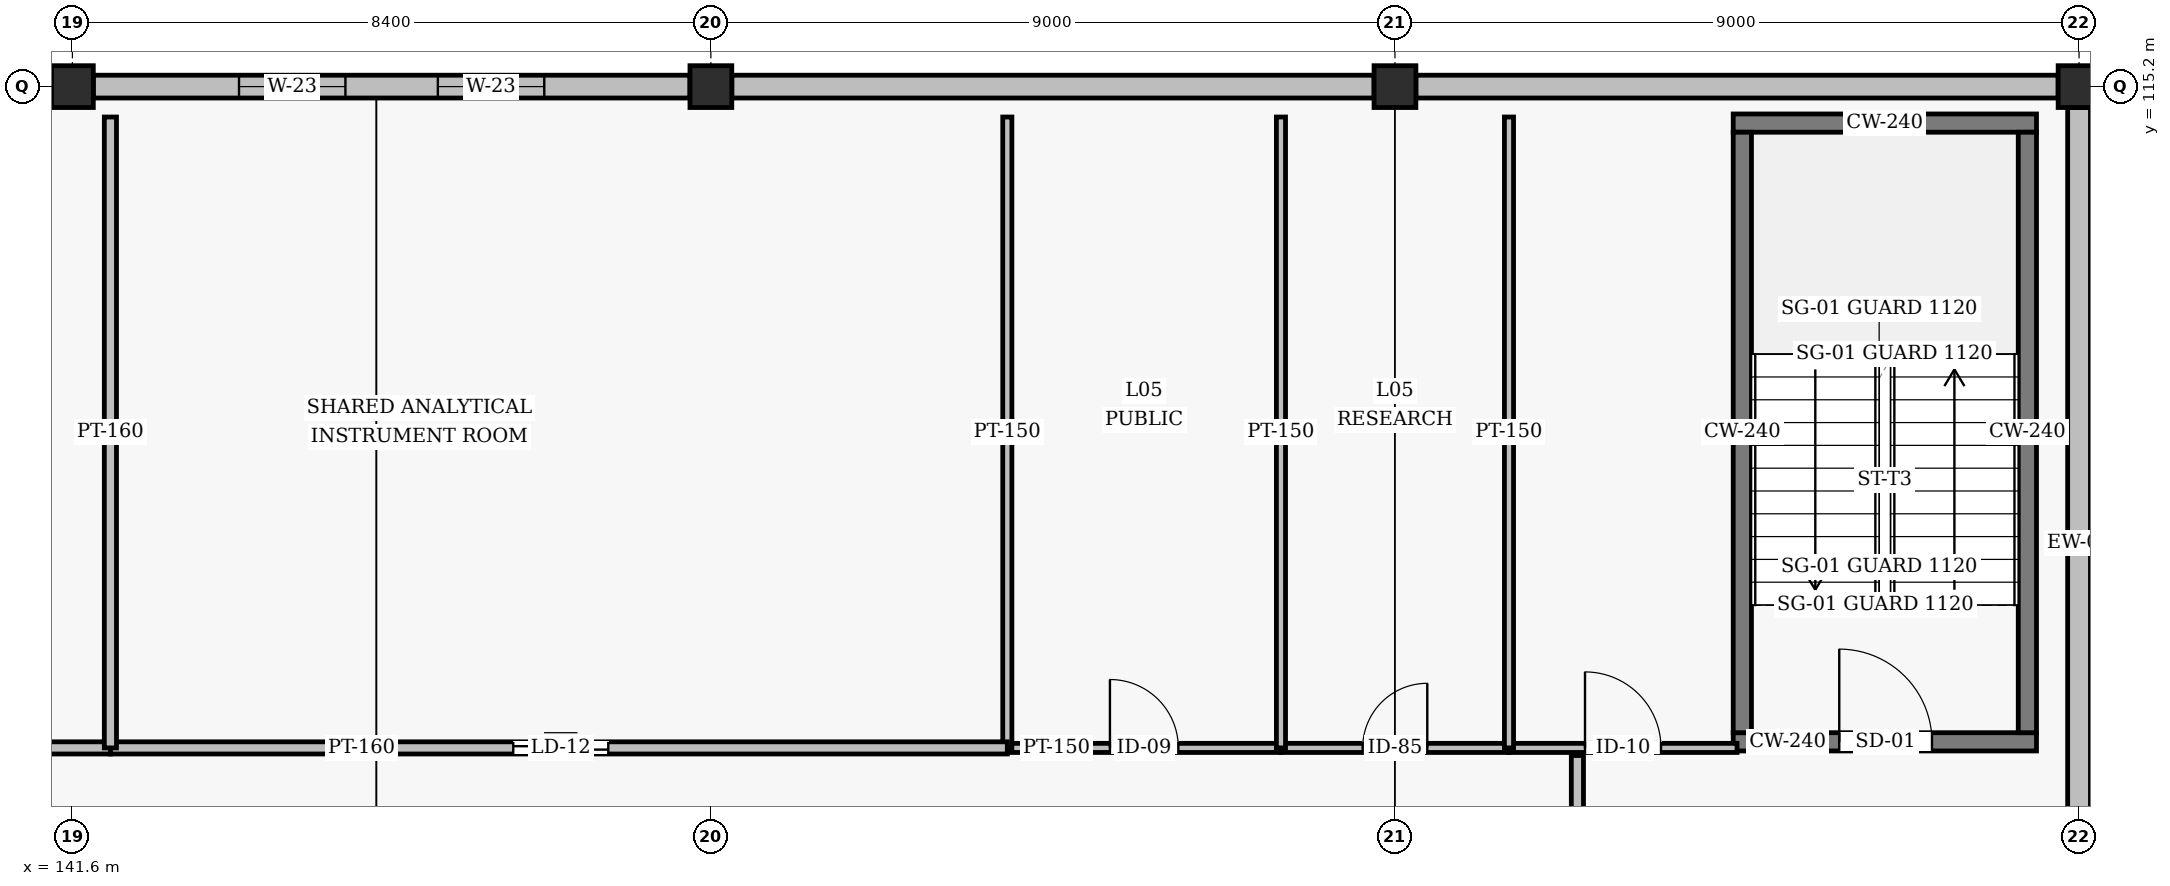
"""IFC4 building model, lengths in metres.
Left out: names, types, materials, properties, quantities, classifications, styles, units other than length and angle.
Written with IfcOpenShell. Run it as: python <this file> out.ifc"""

import sys

from ifc_helpers import new_model, si_unit, direction, frame, frame_2d, origin, origin_2d, place, context, subcontext, project, spatial, rectangle, hollow_rectangle, extrude, element, fill, save


model = new_model("IFC4")
c1 = context("Model", 3, precision=1e-05, world=origin(), true_north=direction((0.0, 1.0)))
c2 = subcontext(c1, "Body", "Model", "MODEL_VIEW")
j1 = project(units=[si_unit("LENGTHUNIT", "METRE"), si_unit("PLANEANGLEUNIT", "RADIAN")], contexts=[c1])
p1 = place(None, origin())
s1 = spatial("IfcSite", under=j1, at=p1, CompositionType="ELEMENT")
p2 = place(p1, origin())
s2 = spatial("IfcBuilding", under=s1, at=p2, CompositionType="ELEMENT")
p3 = place(p2, frame((0.0, 0.0, 21.0)))
s3 = spatial("IfcBuildingStorey", under=s2, at=p3, CompositionType="ELEMENT", Elevation=21.0)
for number, where, z_axis, x_axis in (
    (1, (141.6, 115.2, 0.0), (0.0, 0.0, 1.0), (1.0, 0.0, 0.0)),
    (2, (150.0, 115.2, 0.0), (0.0, 0.0, 1.0), (1.0, 0.0, 0.0)),
    (3, (159.0, 115.2, 0.0), (0.0, 0.0, 1.0), (1.0, 0.0, 0.0)),
    (4, (168.0, 115.2, 0.0), (0.0, 0.0, 1.0), (1.0, 0.0, 0.0)),
):
    element("IfcColumn", number, at=place(p3, frame(where, z_axis=z_axis, x_axis=x_axis)), inside=s3, PredefinedType="COLUMN", context=c2, shape_type="SweptSolid", body=[
        extrude(hollow_rectangle(XDim=0.55, YDim=0.55, WallThickness=0.022, InnerFilletRadius=0.022, OuterFilletRadius=0.044, at=origin_2d()), origin(), (0.0, 0.0, 1.0), 3.6),
    ])
p4 = place(p3, frame((168.0, 103.475, 0.0), z_axis=(0.0, 0.0, 1.0), x_axis=(0.0, 1.0, 0.0)))
e5 = element("IfcWall", 5, at=p4, inside=s3, PredefinedType="SOLIDWALL", context=c2, shape_type="SweptSolid", body=[
    extrude(rectangle(XDim=11.45, YDim=0.3, at=frame_2d((5.725, 0.0))), origin(), (0.0, 0.0, 1.0), 2.558),
])
for number, where, z_axis, x_axis in (
    (6, (167.725, 115.2, 0.0), (0.0, 0.0, 1.0), (-1.0, 0.0, 0.0)),
    (7, (158.725, 115.2, 0.0), (0.0, 0.0, 1.0), (-1.0, 0.0, 0.0)),
):
    element("IfcWall", number, at=place(p3, frame(where, z_axis=z_axis, x_axis=x_axis)), inside=s3, PredefinedType="SOLIDWALL", context=c2, shape_type="SweptSolid", body=[
        extrude(rectangle(XDim=8.45, YDim=0.3, at=frame_2d((4.225, 0.0))), origin(), (0.0, 0.0, 1.0), 2.558),
    ])
p5 = place(p3, frame((149.725, 115.2, 0.0), z_axis=(0.0, 0.0, 1.0), x_axis=(-1.0, 0.0, 0.0)))
e8 = element("IfcWall", 8, at=p5, inside=s3, PredefinedType="SOLIDWALL", context=c2, shape_type="SweptSolid", body=[
    extrude(rectangle(XDim=7.85, YDim=0.3, at=frame_2d((3.925, 0.0))), origin(), (0.0, 0.0, 1.0), 2.85),
])
p6 = place(p5, frame((1.917, 0.0, 0.85)))
e9 = element("IfcOpeningElement", 9, at=p6, cuts=e8, PredefinedType="OPENING", context=c2, shape_type="SweptSolid", body=[
    extrude(rectangle(XDim=1.4, YDim=1.7, at=frame_2d((0.7, 0.85))), frame((0.0, 0.16, 0.0), z_axis=(0.0, -1.0, 0.0), x_axis=(1.0, 0.0, 0.0)), (0.0, 0.0, 1.0), 0.32),
])
p7 = place(p5, frame((4.533, 0.0, 0.85)))
e10 = element("IfcOpeningElement", 10, at=p7, cuts=e8, PredefinedType="OPENING", context=c2, shape_type="SweptSolid", body=[
    extrude(rectangle(XDim=1.4, YDim=1.7, at=frame_2d((0.7, 0.85))), frame((0.0, 0.16, 0.0), z_axis=(0.0, -1.0, 0.0), x_axis=(1.0, 0.0, 0.0)), (0.0, 0.0, 1.0), 0.32),
])
p8 = place(p3, frame((163.45, 106.58, 0.0), z_axis=(0.0, 0.0, 1.0), x_axis=(1.0, 0.0, 0.0)))
e11 = element("IfcWall", 11, at=p8, inside=s3, PredefinedType="SHEAR", context=c2, shape_type="SweptSolid", body=[
    extrude(rectangle(XDim=3.99, YDim=0.24, at=frame_2d((1.995, 0.0))), origin(), (0.0, 0.0, 1.0), 3.35),
])
p9 = place(p8, frame((1.395, 0.0, 0.0)))
e12 = element("IfcOpeningElement", 12, at=p9, cuts=e11, PredefinedType="OPENING", context=c2, shape_type="SweptSolid", body=[
    extrude(rectangle(XDim=1.22, YDim=2.18, at=frame_2d((0.61, 1.09))), frame((0.0, 0.13, 0.0), z_axis=(0.0, -1.0, 0.0), x_axis=(1.0, 0.0, 0.0)), (0.0, 0.0, 1.0), 0.26),
])
p10 = place(p3, frame((163.45, 114.72, 0.0), z_axis=(0.0, 0.0, 1.0), x_axis=(1.0, 0.0, 0.0)))
e13 = element("IfcWall", 13, at=p10, inside=s3, PredefinedType="SHEAR", context=c2, shape_type="SweptSolid", body=[
    extrude(rectangle(XDim=3.99, YDim=0.24, at=frame_2d((1.995, 0.0))), origin(), (0.0, 0.0, 1.0), 3.35),
])
for number, where, z_axis, x_axis in (
    (14, (163.57, 106.7, 0.0), (0.0, 0.0, 1.0), (0.0, 1.0, 0.0)),
    (15, (167.32, 106.7, 0.0), (0.0, 0.0, 1.0), (0.0, 1.0, 0.0)),
):
    element("IfcWall", number, at=place(p3, frame(where, z_axis=z_axis, x_axis=x_axis)), inside=s3, PredefinedType="SHEAR", context=c2, shape_type="SweptSolid", body=[
        extrude(rectangle(XDim=7.9, YDim=0.24, at=frame_2d((3.95, 0.0))), origin(), (0.0, 0.0, 1.0), 3.35),
    ])
p11 = place(p3, frame((153.9, 106.5, 0.0), z_axis=(0.0, 0.0, 1.0), x_axis=(1.0, 0.0, 0.0)))
e16 = element("IfcWall", 16, at=p11, inside=s3, PredefinedType="PARTITIONING", context=c2, shape_type="SweptSolid", body=[
    extrude(rectangle(XDim=3.6, YDim=0.12, at=frame_2d((1.8, 0.0))), origin(), (0.0, 0.0, 1.0), 3.35),
])
p12 = place(p11, frame((1.35, 0.0, 0.0)))
e17 = element("IfcOpeningElement", 17, at=p12, cuts=e16, PredefinedType="OPENING", context=c2, shape_type="SweptSolid", body=[
    extrude(rectangle(XDim=0.9, YDim=2.1, at=frame_2d((0.45, 1.05))), frame((0.0, 0.07, 0.0), z_axis=(0.0, -1.0, 0.0), x_axis=(1.0, 0.0, 0.0)), (0.0, 0.0, 1.0), 0.14),
])
p13 = place(p3, frame((157.5, 106.5, 0.0), z_axis=(0.0, 0.0, 1.0), x_axis=(1.0, 0.0, 0.0)))
e18 = element("IfcWall", 18, at=p13, inside=s3, PredefinedType="PARTITIONING", context=c2, shape_type="SweptSolid", body=[
    extrude(rectangle(XDim=3.0, YDim=0.12, at=frame_2d((1.5, 0.0))), origin(), (0.0, 0.0, 1.0), 2.65),
])
p14 = place(p13, frame((1.075, 0.0, 0.0)))
e19 = element("IfcOpeningElement", 19, at=p14, cuts=e18, PredefinedType="OPENING", context=c2, shape_type="SweptSolid", body=[
    extrude(rectangle(XDim=0.85, YDim=2.1, at=frame_2d((0.425, 1.05))), frame((0.0, 0.07, 0.0), z_axis=(0.0, -1.0, 0.0), x_axis=(1.0, 0.0, 0.0)), (0.0, 0.0, 1.0), 0.14),
])
p15 = place(p3, frame((160.5, 106.5, 0.0), z_axis=(0.0, 0.0, 1.0), x_axis=(1.0, 0.0, 0.0)))
e20 = element("IfcWall", 20, at=p15, inside=s3, PredefinedType="PARTITIONING", context=c2, shape_type="SweptSolid", body=[
    extrude(rectangle(XDim=3.0, YDim=0.12, at=frame_2d((1.5, 0.0))), origin(), (0.0, 0.0, 1.0), 3.35),
])
p16 = place(p15, frame((1.0, 0.0, 0.0)))
e21 = element("IfcOpeningElement", 21, at=p16, cuts=e20, PredefinedType="OPENING", context=c2, shape_type="SweptSolid", body=[
    extrude(rectangle(XDim=1.0, YDim=2.1, at=frame_2d((0.5, 1.05))), frame((0.0, 0.07, 0.0), z_axis=(0.0, -1.0, 0.0), x_axis=(1.0, 0.0, 0.0)), (0.0, 0.0, 1.0), 0.14),
])
for number, where, z_axis, x_axis in (
    (22, (153.9, 106.5, 0.0), (0.0, 0.0, 1.0), (0.0, 1.0, 0.0)),
    (23, (157.5, 106.5, 0.0), (0.0, 0.0, 1.0), (0.0, 1.0, 0.0)),
):
    element("IfcWall", number, at=place(p3, frame(where, z_axis=z_axis, x_axis=x_axis)), inside=s3, PredefinedType="PARTITIONING", context=c2, shape_type="SweptSolid", body=[
        extrude(rectangle(XDim=8.3, YDim=0.12, at=frame_2d((4.15, 0.0))), origin(), (0.0, 0.0, 1.0), 2.954),
    ])
p17 = place(p3, frame((160.5, 106.5, 0.0), z_axis=(0.0, 0.0, 1.0), x_axis=(0.0, 1.0, 0.0)))
e24 = element("IfcWall", 24, at=p17, inside=s3, PredefinedType="PARTITIONING", context=c2, shape_type="SweptSolid", body=[
    extrude(rectangle(XDim=8.3, YDim=0.12, at=frame_2d((4.15, 0.0))), origin(), (0.0, 0.0, 1.0), 3.35),
])
p18 = place(p3, frame((161.4, 92.3, 0.0), z_axis=(0.0, 0.0, 1.0), x_axis=(0.0, 1.0, 0.0)))
e25 = element("IfcWall", 25, at=p18, inside=s3, PredefinedType="PARTITIONING", context=c2, shape_type="SweptSolid", body=[
    extrude(rectangle(XDim=14.1, YDim=0.16, at=frame_2d((7.05, 0.0))), origin(), (0.0, 0.0, 1.0), 2.75),
])
p19 = place(p18, frame((6.5, 0.0, 0.0)))
e26 = element("IfcOpeningElement", 26, at=p19, cuts=e25, PredefinedType="OPENING", context=c2, shape_type="SweptSolid", body=[
    extrude(rectangle(XDim=1.08, YDim=2.08, at=frame_2d((0.54, 1.04))), frame((0.0, 0.09, 0.0), z_axis=(0.0, -1.0, 0.0), x_axis=(1.0, 0.0, 0.0)), (0.0, 0.0, 1.0), 0.18),
])
p20 = place(p3, frame((125.0, 106.5, 0.0), z_axis=(0.0, 0.0, 1.0), x_axis=(1.0, 0.0, 0.0)))
e27 = element("IfcWall", 27, at=p20, inside=s3, PredefinedType="PARTITIONING", context=c2, shape_type="SweptSolid", body=[
    extrude(rectangle(XDim=17.1, YDim=0.16, at=frame_2d((8.55, 0.0))), origin(), (0.0, 0.0, 1.0), 2.65),
])
p21 = place(p20, frame((8.0, 0.0, 0.0)))
e28 = element("IfcOpeningElement", 28, at=p21, cuts=e27, PredefinedType="OPENING", context=c2, shape_type="SweptSolid", body=[
    extrude(rectangle(XDim=1.08, YDim=2.08, at=frame_2d((0.54, 1.04))), frame((0.0, 0.09, 0.0), z_axis=(0.0, -1.0, 0.0), x_axis=(1.0, 0.0, 0.0)), (0.0, 0.0, 1.0), 0.18),
])
p22 = place(p3, frame((142.1, 106.5, 0.0), z_axis=(0.0, 0.0, 1.0), x_axis=(1.0, 0.0, 0.0)))
e29 = element("IfcWall", 29, at=p22, inside=s3, PredefinedType="PARTITIONING", context=c2, shape_type="SweptSolid", body=[
    extrude(rectangle(XDim=11.8, YDim=0.16, at=frame_2d((5.9, 0.0))), origin(), (0.0, 0.0, 1.0), 2.65),
])
p23 = place(p22, frame((5.3, 0.0, 0.0)))
e30 = element("IfcOpeningElement", 30, at=p23, cuts=e29, PredefinedType="OPENING", context=c2, shape_type="SweptSolid", body=[
    extrude(rectangle(XDim=1.25, YDim=2.12, at=frame_2d((0.625, 1.06))), frame((0.0, 0.09, 0.0), z_axis=(0.0, -1.0, 0.0), x_axis=(1.0, 0.0, 0.0)), (0.0, 0.0, 1.0), 0.18),
])
p24 = place(p3, frame((142.1, 106.5, 0.0), z_axis=(0.0, 0.0, 1.0), x_axis=(0.0, 1.0, 0.0)))
e31 = element("IfcWall", 31, at=p24, inside=s3, PredefinedType="PARTITIONING", context=c2, shape_type="SweptSolid", body=[
    extrude(rectangle(XDim=8.3, YDim=0.16, at=frame_2d((4.15, 0.0))), origin(), (0.0, 0.0, 1.0), 3.004),
])
p25 = place(p6, origin())
e32 = element("IfcWindow", 32, at=p25, inside=s3, PartitioningType="SINGLE_PANEL", PredefinedType="WINDOW", context=c2, shape_type="SweptSolid", body=[
    extrude(rectangle(XDim=1.4, YDim=1.7, at=frame_2d((0.7, 0.85))), frame((0.0, 0.03, 0.0), z_axis=(0.0, -1.0, 0.0), x_axis=(1.0, 0.0, 0.0)), (0.0, 0.0, 1.0), 0.06),
])
fill(e9, e32)
p26 = place(p7, origin())
e33 = element("IfcWindow", 33, at=p26, inside=s3, PartitioningType="SINGLE_PANEL", PredefinedType="WINDOW", context=c2, shape_type="SweptSolid", body=[
    extrude(rectangle(XDim=1.4, YDim=1.7, at=frame_2d((0.7, 0.85))), frame((0.0, 0.03, 0.0), z_axis=(0.0, -1.0, 0.0), x_axis=(1.0, 0.0, 0.0)), (0.0, 0.0, 1.0), 0.06),
])
fill(e10, e33)
p27 = place(p9, origin())
e34 = element("IfcDoor", 34, at=p27, inside=s3, OperationType="SINGLE_SWING_LEFT", PredefinedType="DOOR", context=c2, shape_type="SweptSolid", body=[
    extrude(rectangle(XDim=1.22, YDim=2.18, at=frame_2d((0.61, 1.09))), frame((0.0, 0.025, 0.0), z_axis=(0.0, -1.0, 0.0), x_axis=(1.0, 0.0, 0.0)), (0.0, 0.0, 1.0), 0.05),
])
fill(e12, e34)
p28 = place(p12, origin())
e35 = element("IfcDoor", 35, at=p28, inside=s3, OperationType="SINGLE_SWING_LEFT", PredefinedType="DOOR", context=c2, shape_type="SweptSolid", body=[
    extrude(rectangle(XDim=0.9, YDim=2.1, at=frame_2d((0.45, 1.05))), frame((0.0, 0.025, 0.0), z_axis=(0.0, -1.0, 0.0), x_axis=(1.0, 0.0, 0.0)), (0.0, 0.0, 1.0), 0.05),
])
fill(e17, e35)
p29 = place(p14, origin())
e36 = element("IfcDoor", 36, at=p29, inside=s3, OperationType="SINGLE_SWING_RIGHT", PredefinedType="DOOR", context=c2, shape_type="SweptSolid", body=[
    extrude(rectangle(XDim=0.85, YDim=2.1, at=frame_2d((0.425, 1.05))), frame((0.0, 0.025, 0.0), z_axis=(0.0, -1.0, 0.0), x_axis=(1.0, 0.0, 0.0)), (0.0, 0.0, 1.0), 0.05),
])
fill(e19, e36)
p30 = place(p16, origin())
e37 = element("IfcDoor", 37, at=p30, inside=s3, OperationType="SINGLE_SWING_LEFT", PredefinedType="DOOR", context=c2, shape_type="SweptSolid", body=[
    extrude(rectangle(XDim=1.0, YDim=2.1, at=frame_2d((0.5, 1.05))), frame((0.0, 0.025, 0.0), z_axis=(0.0, -1.0, 0.0), x_axis=(1.0, 0.0, 0.0)), (0.0, 0.0, 1.0), 0.05),
])
fill(e21, e37)
p31 = place(p23, origin())
e38 = element("IfcDoor", 38, at=p31, inside=s3, OperationType="SINGLE_SWING_LEFT", PredefinedType="DOOR", context=c2, shape_type="SweptSolid", body=[
    extrude(rectangle(XDim=1.25, YDim=2.12, at=frame_2d((0.625, 1.06))), frame((0.0, 0.025, 0.0), z_axis=(0.0, -1.0, 0.0), x_axis=(1.0, 0.0, 0.0)), (0.0, 0.0, 1.0), 0.05),
])
fill(e30, e38)
save(model, sys.argv[1])
